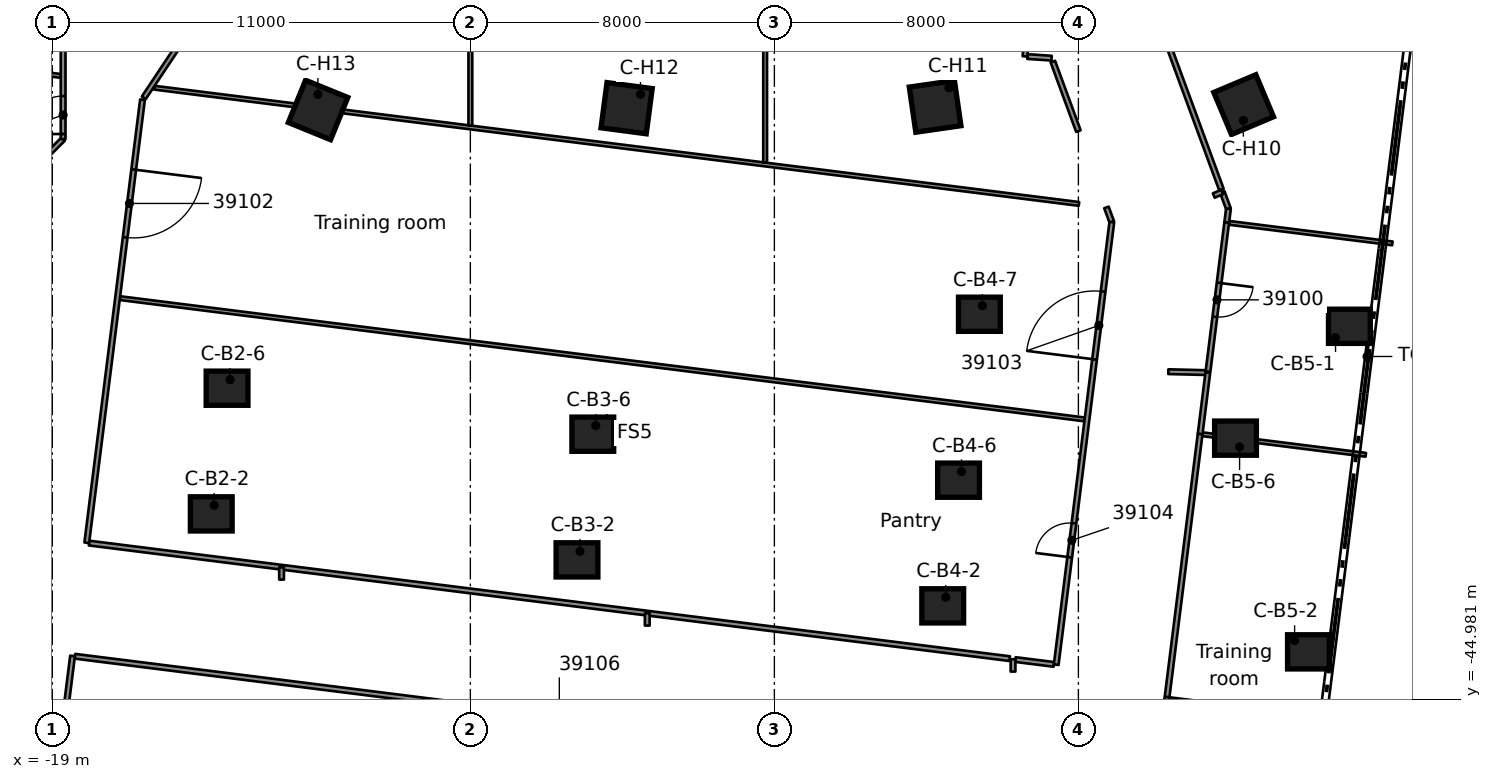
"""IFC4 building model, lengths in metres.
Left out: names, types, materials, properties, quantities, classifications, styles, units other than length and angle.
Written with IfcOpenShell. Run it as: python <this file> out.ifc"""

import sys

from ifc_helpers import new_model, si_unit, direction, frame, frame_2d, origin, origin_2d, place, context, subcontext, project, spatial, rectangle, extrude, element, fill, save


model = new_model("IFC4")
c1 = context("Model", 3, precision=1e-05, world=origin(), true_north=direction((0.0, 1.0)))
c2 = subcontext(c1, "Body", "Model", "MODEL_VIEW")
j1 = project(units=[si_unit("LENGTHUNIT", "METRE"), si_unit("PLANEANGLEUNIT", "RADIAN")], contexts=[c1])
p1 = place(None, origin())
s1 = spatial("IfcSite", under=j1, at=p1, CompositionType="ELEMENT")
p2 = place(p1, origin())
s2 = spatial("IfcBuilding", under=s1, at=p2, CompositionType="ELEMENT")
p3 = place(p2, frame((0.0, 0.0, 192.1)))
s3 = spatial("IfcBuildingStorey", under=s2, at=p3, CompositionType="ELEMENT", Elevation=192.1)
for number, where, z_axis, x_axis in (
    (1, (-14.818, -40.098, 0.0), (0.0, 0.0, 1.0), (1.0, 0.0, 0.0)),
    (2, (-14.402, -36.791, 0.0), (0.0, 0.0, 1.0), (1.0, 0.0, 0.0)),
    (3, (-5.194, -41.308, 0.0), (0.0, 0.0, 1.0), (1.0, 0.0, 0.0)),
    (4, (-4.778, -38.001, 0.0), (0.0, 0.0, 1.0), (1.0, 0.0, 0.0)),
    (5, (4.43, -42.518, 0.0), (0.0, 0.0, 1.0), (1.0, 0.0, 0.0)),
    (6, (4.846, -39.211, 0.0), (0.0, 0.0, 1.0), (1.0, 0.0, 0.0)),
    (7, (5.395, -34.845, 0.0), (0.0, 0.0, 1.0), (1.0, 0.0, 0.0)),
    (8, (15.131, -35.162, 0.0), (0.0, 0.0, 1.0), (1.0, 0.0, 0.0)),
    (9, (14.054, -43.728, 0.0), (0.0, 0.0, 1.0), (1.0, 0.0, 0.0)),
    (10, (12.134, -38.105, 0.0), (0.0, 0.0, 1.0), (1.0, 0.0, 0.0)),
):
    element("IfcColumn", number, at=place(p3, frame(where, z_axis=z_axis, x_axis=x_axis)), inside=s3, PredefinedType="COLUMN", context=c2, shape_type="SweptSolid", body=[
        extrude(rectangle(XDim=1.1, YDim=0.9, at=origin_2d()), origin(), (0.0, 0.0, 1.0), 3.5),
    ])
for number, where, z_axis, x_axis in (
    (11, (12.349, -29.329, 0.0), (0.0, 0.0, 1.0), (0.388, -0.922, 0.0)),
    (12, (4.23, -29.376, 0.0), (0.0, 0.0, 1.0), (0.143, -0.99, 0.0)),
    (13, (-3.888, -29.423, 0.0), (0.0, 0.0, 1.0), (-0.131, -0.991, 0.0)),
    (14, (-12.007, -29.47, 0.0), (0.0, 0.0, 1.0), (-0.377, -0.926, 0.0)),
):
    element("IfcColumn", number, at=place(p3, frame(where, z_axis=z_axis, x_axis=x_axis)), inside=s3, PredefinedType="COLUMN", context=c2, shape_type="SweptSolid", body=[
        extrude(rectangle(XDim=1.2, YDim=1.2, at=origin_2d()), origin(), (0.0, 0.0, 1.0), 3.5),
    ])
p4 = place(p3, frame((7.328, -28.197, 0.0), z_axis=(0.0, 0.0, 1.0), x_axis=(0.34495039198, -0.938620917662, 0.0)))
e15 = element("IfcWall", 15, at=p4, inside=s3, PredefinedType="PARTITIONING", context=c2, shape_type="SweptSolid", body=[
    extrude(rectangle(XDim=1.948, YDim=0.125, at=frame_2d((0.974, 0.0))), origin(), (0.0, 0.0, 1.0), 3.06),
])
p5 = place(p3, frame((8.738, -32.034, 0.0), z_axis=(0.0, 0.0, 1.0), x_axis=(0.344934891115, -0.938626614204, 0.0)))
e16 = element("IfcWall", 16, at=p5, inside=s3, PredefinedType="PARTITIONING", context=c2, shape_type="SweptSolid", body=[
    extrude(rectangle(XDim=0.411, YDim=0.125, at=frame_2d((0.206, 0.0))), origin(), (0.0, 0.0, 1.0), 3.06),
])
p6 = place(p3, frame((11.786, -31.628, 0.0), z_axis=(0.0, 0.0, 1.0), x_axis=(0.346065449672, -0.938210373287, 0.0)))
e17 = element("IfcWall", 17, at=p6, inside=s3, PredefinedType="PARTITIONING", context=c2, shape_type="SweptSolid", body=[
    extrude(rectangle(XDim=0.471, YDim=0.125, at=frame_2d((0.236, 0.0))), origin(), (0.0, 0.0, 1.0), 3.06),
])
p7 = place(p3, frame((10.365, -27.761, 0.0), z_axis=(0.0, 0.0, 1.0), x_axis=(0.34515538391, -0.938545556144, 0.0)))
e18 = element("IfcWall", 18, at=p7, inside=s3, PredefinedType="PARTITIONING", context=c2, shape_type="SweptSolid", body=[
    extrude(rectangle(XDim=4.053, YDim=0.125, at=frame_2d((2.026, 0.0))), origin(), (0.0, 0.0, 1.0), 3.06),
])
p8 = place(p3, frame((6.979, -47.035, 0.0), z_axis=(0.0, 0.0, 1.0), x_axis=(-0.992192052325, 0.124719410292, 0.0)))
e19 = element("IfcWall", 19, at=p8, inside=s3, PredefinedType="PARTITIONING", context=c2, shape_type="SweptSolid", body=[
    extrude(rectangle(XDim=25.585, YDim=0.125, at=frame_2d((12.792, 0.0))), origin(), (0.0, 0.0, 1.0), 3.06),
])
p9 = place(p8, frame((12.288, 0.0, 0.0)))
e20 = element("IfcOpeningElement", 20, at=p9, cuts=e19, PredefinedType="OPENING", context=c2, shape_type="SweptSolid", body=[
    extrude(rectangle(XDim=0.9, YDim=2.1, at=frame_2d((0.45, 1.05))), frame((0.0, 0.073, 0.0), z_axis=(0.0, -1.0, 0.0), x_axis=(1.0, 0.0, 0.0)), (0.0, 0.0, 1.0), 0.145),
])
p10 = place(p3, frame((-18.032, -40.866, 0.0), z_axis=(0.0, 0.0, 1.0), x_axis=(0.9922120451, -0.124560256738, 0.0)))
e21 = element("IfcWall", 21, at=p10, inside=s3, PredefinedType="PARTITIONING", context=c2, shape_type="SweptSolid", body=[
    extrude(rectangle(XDim=24.414, YDim=0.125, at=frame_2d((12.207, 0.0))), origin(), (0.0, 0.0, 1.0), 3.06),
])
p11 = place(p3, frame((6.342, -43.931, 0.0), z_axis=(0.0, 0.0, 1.0), x_axis=(0.992192944833, -0.124712309833, 0.0)))
e22 = element("IfcWall", 22, at=p11, inside=s3, PredefinedType="PARTITIONING", context=c2, shape_type="SweptSolid", body=[
    extrude(rectangle(XDim=1.02, YDim=0.125, at=frame_2d((0.51, 0.0))), origin(), (0.0, 0.0, 1.0), 3.06),
])
p12 = place(p3, frame((-17.221, -34.421, 0.0), z_axis=(0.0, 0.0, 1.0), x_axis=(0.992190871449, -0.124728804262, 0.0)))
e23 = element("IfcWall", 23, at=p12, inside=s3, PredefinedType="PARTITIONING", context=c2, shape_type="SweptSolid", body=[
    extrude(rectangle(XDim=25.585, YDim=0.1, at=frame_2d((12.792, 0.0))), origin(), (0.0, 0.0, 1.0), 3.06),
])
p13 = place(p3, frame((11.266, -38.003, 0.0), z_axis=(0.0, 0.0, 1.0), x_axis=(0.992194392082, -0.124700795187, 0.0)))
e24 = element("IfcWall", 24, at=p13, inside=s3, PredefinedType="PARTITIONING", context=c2, shape_type="SweptSolid", body=[
    extrude(rectangle(XDim=4.331, YDim=0.1, at=frame_2d((2.165, 0.0))), origin(), (0.0, 0.0, 1.0), 3.06),
])
p14 = place(p3, frame((-23.921, -27.927, 0.0), z_axis=(0.0, 0.0, 1.0), x_axis=(0.992179743224, -0.124817295018, 0.0)))
e25 = element("IfcWall", 25, at=p14, inside=s3, PredefinedType="PARTITIONING", context=c2, shape_type="SweptSolid", body=[
    extrude(rectangle(XDim=5.183, YDim=0.1, at=frame_2d((2.592, 0.0))), origin(), (0.0, 0.0, 1.0), 3.06),
])
p15 = place(p3, frame((-16.315, -28.884, 0.0), z_axis=(0.0, 0.0, 1.0), x_axis=(0.992194172305, -0.124702543857, 0.0)))
e26 = element("IfcWall", 26, at=p15, inside=s3, PredefinedType="PARTITIONING", context=c2, shape_type="SweptSolid", body=[
    extrude(rectangle(XDim=24.521, YDim=0.1, at=frame_2d((12.261, 0.0))), origin(), (0.0, 0.0, 1.0), 3.06),
])
p16 = place(p3, frame((11.965, -32.44, 0.0), z_axis=(0.0, 0.0, 1.0), x_axis=(0.992194392082, -0.124700795187, 0.0)))
e27 = element("IfcWall", 27, at=p16, inside=s3, PredefinedType="PARTITIONING", context=c2, shape_type="SweptSolid", body=[
    extrude(rectangle(XDim=4.331, YDim=0.1, at=frame_2d((2.165, 0.0))), origin(), (0.0, 0.0, 1.0), 3.06),
])
p17 = place(p3, frame((6.658, -28.064, 0.0), z_axis=(0.0, 0.0, 1.0), x_axis=(0.997732391846, -0.067305826357, 0.0)))
e28 = element("IfcWall", 28, at=p17, inside=s3, PredefinedType="PARTITIONING", context=c2, shape_type="SweptSolid", body=[
    extrude(rectangle(XDim=0.638, YDim=0.125, at=frame_2d((0.319, 0.0))), origin(), (0.0, 0.0, 1.0), 3.06),
])
p18 = place(p3, frame((10.366, -36.356, 0.0), z_axis=(0.0, 0.0, 1.0), x_axis=(0.999700907591, -0.024455988254, 0.0)))
e29 = element("IfcWall", 29, at=p18, inside=s3, PredefinedType="PARTITIONING", context=c2, shape_type="SweptSolid", body=[
    extrude(rectangle(XDim=0.978, YDim=0.125, at=frame_2d((0.489, 0.0))), origin(), (0.0, 0.0, 1.0), 3.06),
])
p19 = place(p3, frame((-19.182, -30.703, 0.0), z_axis=(0.0, 0.0, 1.0), x_axis=(0.707106781187, 0.707106781187, 0.0)))
e30 = element("IfcWall", 30, at=p19, inside=s3, PredefinedType="PARTITIONING", context=c2, shape_type="SweptSolid", body=[
    extrude(rectangle(XDim=0.659, YDim=0.125, at=frame_2d((0.329, 0.0))), origin(), (0.0, 0.0, 1.0), 3.06),
])
p20 = place(p3, frame((11.563, -31.721, 0.0), z_axis=(0.0, 0.0, 1.0), x_axis=(0.921426271694, 0.3885532471, 0.0)))
e31 = element("IfcWall", 31, at=p20, inside=s3, PredefinedType="PARTITIONING", context=c2, shape_type="SweptSolid", body=[
    extrude(rectangle(XDim=0.242, YDim=0.125, at=frame_2d((0.121, 0.0))), origin(), (0.0, 0.0, 1.0), 3.06),
])
p21 = place(p3, frame((-13.009, -23.769, 0.0), z_axis=(0.0, 0.0, 1.0), x_axis=(-0.554421269435, -0.832236178016, 0.0)))
e32 = element("IfcWall", 32, at=p21, inside=s3, PredefinedType="PARTITIONING", context=c2, shape_type="SweptSolid", body=[
    extrude(rectangle(XDim=6.464, YDim=0.125, at=frame_2d((3.232, 0.0))), origin(), (0.0, 0.0, 1.0), 3.06),
])
p22 = place(p3, frame((11.903, -32.432, 0.0), z_axis=(0.0, 0.0, 1.0), x_axis=(0.125847054802, 0.992049655409, 0.0)))
e33 = element("IfcWall", 33, at=p22, inside=s3, PredefinedType="PARTITIONING", context=c2, shape_type="SweptSolid", body=[
    extrude(rectangle(XDim=0.365, YDim=0.125, at=frame_2d((0.182, 0.0))), origin(), (0.0, 0.0, 1.0), 3.06),
])
p23 = place(p3, frame((11.204, -37.994, 0.0), z_axis=(0.0, 0.0, 1.0), x_axis=(-0.124754953573, -0.992187583856, 0.0)))
e34 = element("IfcWall", 34, at=p23, inside=s3, PredefinedType="PARTITIONING", context=c2, shape_type="SweptSolid", body=[
    extrude(rectangle(XDim=12.849, YDim=0.125, at=frame_2d((6.425, 0.0))), origin(), (0.0, 0.0, 1.0), 3.06),
])
p24 = place(p23, frame((6.976, 0.0, 0.0)))
e35 = element("IfcOpeningElement", 35, at=p24, cuts=e34, PredefinedType="OPENING", context=c2, shape_type="SweptSolid", body=[
    extrude(rectangle(XDim=1.0, YDim=2.1, at=frame_2d((0.5, 1.05))), frame((0.0, 0.073, 0.0), z_axis=(0.0, -1.0, 0.0), x_axis=(1.0, 0.0, 0.0)), (0.0, 0.0, 1.0), 0.145),
])
p25 = place(p3, frame((11.903, -32.432, 0.0), z_axis=(0.0, 0.0, 1.0), x_axis=(-0.124726255985, -0.992191191791, 0.0)))
e36 = element("IfcWall", 36, at=p25, inside=s3, PredefinedType="PARTITIONING", context=c2, shape_type="SweptSolid", body=[
    extrude(rectangle(XDim=3.954, YDim=0.125, at=frame_2d((1.977, 0.0))), origin(), (0.0, 0.0, 1.0), 3.06),
])
p26 = place(p25, frame((1.6, 0.0, 0.0)))
e37 = element("IfcOpeningElement", 37, at=p26, cuts=e36, PredefinedType="OPENING", context=c2, shape_type="SweptSolid", body=[
    extrude(rectangle(XDim=0.9, YDim=2.1, at=frame_2d((0.45, 1.05))), frame((0.0, 0.073, 0.0), z_axis=(0.0, -1.0, 0.0), x_axis=(1.0, 0.0, 0.0)), (0.0, 0.0, 1.0), 0.145),
])
p27 = place(p3, frame((7.416, -44.066, 0.0), z_axis=(0.0, 0.0, 1.0), x_axis=(0.124705364761, 0.992193817759, 0.0)))
e38 = element("IfcWall", 38, at=p27, inside=s3, PredefinedType="PARTITIONING", context=c2, shape_type="SweptSolid", body=[
    extrude(rectangle(XDim=11.739, YDim=0.125, at=frame_2d((5.869, 0.0))), origin(), (0.0, 0.0, 1.0), 3.06),
])
p28 = place(p27, frame((8.097, 0.0, 0.0)))
e39 = element("IfcOpeningElement", 39, at=p28, cuts=e38, PredefinedType="OPENING", context=c2, shape_type="SweptSolid", body=[
    extrude(rectangle(XDim=1.8, YDim=2.1, at=frame_2d((0.9, 1.05))), frame((0.0, 0.073, 0.0), z_axis=(0.0, -1.0, 0.0), x_axis=(1.0, 0.0, 0.0)), (0.0, 0.0, 1.0), 0.145),
])
p29 = place(p27, frame((2.85, 0.0, 0.0)))
e40 = element("IfcOpeningElement", 40, at=p29, cuts=e38, PredefinedType="OPENING", context=c2, shape_type="SweptSolid", body=[
    extrude(rectangle(XDim=0.9, YDim=2.1, at=frame_2d((0.45, 1.05))), frame((0.0, 0.073, 0.0), z_axis=(0.0, -1.0, 0.0), x_axis=(1.0, 0.0, 0.0)), (0.0, 0.0, 1.0), 0.145),
])
p30 = place(p3, frame((-18.468, -43.836, 0.0), z_axis=(0.0, 0.0, 1.0), x_axis=(-0.124739851626, -0.992189482617, 0.0)))
e41 = element("IfcWall", 41, at=p30, inside=s3, PredefinedType="PARTITIONING", context=c2, shape_type="SweptSolid", body=[
    extrude(rectangle(XDim=3.366, YDim=0.125, at=frame_2d((1.683, 0.0))), origin(), (0.0, 0.0, 1.0), 3.06),
])
p31 = place(p30, frame((1.35, 0.0, 0.0)))
e42 = element("IfcOpeningElement", 42, at=p31, cuts=e41, PredefinedType="OPENING", context=c2, shape_type="SweptSolid", body=[
    extrude(rectangle(XDim=0.9, YDim=2.1, at=frame_2d((0.45, 1.05))), frame((0.0, 0.073, 0.0), z_axis=(0.0, -1.0, 0.0), x_axis=(1.0, 0.0, 0.0)), (0.0, 0.0, 1.0), 0.145),
])
p32 = place(p3, frame((-16.627, -29.199, 0.0), z_axis=(0.0, 0.0, 1.0), x_axis=(-0.124845291818, -0.992176220795, 0.0)))
e43 = element("IfcWall", 43, at=p32, inside=s3, PredefinedType="PARTITIONING", context=c2, shape_type="SweptSolid", body=[
    extrude(rectangle(XDim=11.751, YDim=0.125, at=frame_2d((5.875, 0.0))), origin(), (0.0, 0.0, 1.0), 3.06),
])
p33 = place(p32, frame((1.852, 0.0, 0.0)))
e44 = element("IfcOpeningElement", 44, at=p33, cuts=e43, PredefinedType="OPENING", context=c2, shape_type="SweptSolid", body=[
    extrude(rectangle(XDim=1.8, YDim=2.1, at=frame_2d((0.9, 1.05))), frame((0.0, 0.073, 0.0), z_axis=(0.0, -1.0, 0.0), x_axis=(1.0, 0.0, 0.0)), (0.0, 0.0, 1.0), 0.145),
])
p34 = place(p3, frame((11.204, -37.995, 0.0), z_axis=(0.0, 0.0, 1.0), x_axis=(0.124201089062, 0.992257068242, 0.0)))
e45 = element("IfcWall", 45, at=p34, inside=s3, PredefinedType="PARTITIONING", context=c2, shape_type="SweptSolid", body=[
    extrude(rectangle(XDim=1.626, YDim=0.125, at=frame_2d((0.813, 0.0))), origin(), (0.0, 0.0, 1.0), 3.06),
])
p35 = place(p3, frame((6.596, -28.059, 0.0), z_axis=(0.0, 0.0, 1.0), x_axis=(0.066948921555, 0.99775640409, 0.0)))
e46 = element("IfcWall", 46, at=p35, inside=s3, PredefinedType="PARTITIONING", context=c2, shape_type="SweptSolid", body=[
    extrude(rectangle(XDim=10.44, YDim=0.125, at=frame_2d((5.22, 0.0))), origin(), (0.0, 0.0, 1.0), 3.06),
])
p36 = place(p35, frame((4.85, 0.0, 0.0)))
e47 = element("IfcOpeningElement", 47, at=p36, cuts=e46, PredefinedType="OPENING", context=c2, shape_type="SweptSolid", body=[
    extrude(rectangle(XDim=0.9, YDim=2.1, at=frame_2d((0.45, 1.05))), frame((0.0, 0.073, 0.0), z_axis=(0.0, -1.0, 0.0), x_axis=(1.0, 0.0, 0.0)), (0.0, 0.0, 1.0), 0.145),
])
p37 = place(p3, frame((6.28, -44.247, 0.0), z_axis=(0.0, 0.0, 1.0), x_axis=(0.0, 1.0, 0.0)))
e48 = element("IfcWall", 48, at=p37, inside=s3, PredefinedType="PARTITIONING", context=c2, shape_type="SweptSolid", body=[
    extrude(rectangle(XDim=0.324, YDim=0.125, at=frame_2d((0.162, 0.0))), origin(), (0.0, 0.0, 1.0), 3.06),
])
p38 = place(p3, frame((-0.243, -30.854, 0.0), z_axis=(0.0, 0.0, 1.0), x_axis=(0.0, 1.0, 0.0)))
e49 = element("IfcWall", 49, at=p38, inside=s3, PredefinedType="PARTITIONING", context=c2, shape_type="SweptSolid", body=[
    extrude(rectangle(XDim=16.391, YDim=0.1, at=frame_2d((8.196, 0.0))), origin(), (0.0, 0.0, 1.0), 3.06),
])
p39 = place(p3, frame((-3.345, -43.037, 0.0), z_axis=(0.0, 0.0, 1.0), x_axis=(0.0, 1.0, 0.0)))
e50 = element("IfcWall", 50, at=p39, inside=s3, PredefinedType="PARTITIONING", context=c2, shape_type="SweptSolid", body=[
    extrude(rectangle(XDim=0.324, YDim=0.125, at=frame_2d((0.162, 0.0))), origin(), (0.0, 0.0, 1.0), 3.06),
])
p40 = place(p3, frame((-8.0, -29.879, 0.0), z_axis=(0.0, 0.0, 1.0), x_axis=(0.0, 1.0, 0.0)))
e51 = element("IfcWall", 51, at=p40, inside=s3, PredefinedType="PARTITIONING", context=c2, shape_type="SweptSolid", body=[
    extrude(rectangle(XDim=15.416, YDim=0.1, at=frame_2d((7.708, 0.0))), origin(), (0.0, 0.0, 1.0), 3.06),
])
p41 = place(p3, frame((-12.968, -41.827, 0.0), z_axis=(0.0, 0.0, 1.0), x_axis=(0.0, 1.0, 0.0)))
e52 = element("IfcWall", 52, at=p41, inside=s3, PredefinedType="PARTITIONING", context=c2, shape_type="SweptSolid", body=[
    extrude(rectangle(XDim=0.324, YDim=0.125, at=frame_2d((0.162, 0.0))), origin(), (0.0, 0.0, 1.0), 3.06),
])
p42 = place(p3, frame((-18.716, -30.237, 0.0), z_axis=(0.0, 0.0, 1.0), x_axis=(0.0, 1.0, 0.0)))
e53 = element("IfcWall", 53, at=p42, inside=s3, PredefinedType="PARTITIONING", context=c2, shape_type="SweptSolid", body=[
    extrude(rectangle(XDim=2.826, YDim=0.125, at=frame_2d((1.413, 0.0))), origin(), (0.0, 0.0, 1.0), 3.06),
])
p43 = place(p42, frame((0.134, 0.0, 0.0)))
e54 = element("IfcOpeningElement", 54, at=p43, cuts=e53, PredefinedType="OPENING", context=c2, shape_type="SweptSolid", body=[
    extrude(rectangle(XDim=1.0, YDim=2.1, at=frame_2d((0.5, 1.05))), frame((0.0, 0.073, 0.0), z_axis=(0.0, -1.0, 0.0), x_axis=(1.0, 0.0, 0.0)), (0.0, 0.0, 1.0), 0.145),
])
p44 = place(p26, origin())
e55 = element("IfcDoor", 55, at=p44, inside=s3, OperationType="SINGLE_SWING_RIGHT", PredefinedType="DOOR", context=c2, shape_type="SweptSolid", body=[
    extrude(rectangle(XDim=0.9, YDim=2.1, at=frame_2d((0.45, 1.05))), frame((0.0, 0.025, 0.0), z_axis=(0.0, -1.0, 0.0), x_axis=(1.0, 0.0, 0.0)), (0.0, 0.0, 1.0), 0.05),
])
fill(e37, e55)
p45 = place(p24, origin())
e56 = element("IfcDoor", 56, at=p45, inside=s3, OperationType="SINGLE_SWING_RIGHT", PredefinedType="DOOR", context=c2, shape_type="SweptSolid", body=[
    extrude(rectangle(XDim=1.0, YDim=2.1, at=frame_2d((0.5, 1.05))), frame((0.0, 0.025, 0.0), z_axis=(0.0, -1.0, 0.0), x_axis=(1.0, 0.0, 0.0)), (0.0, 0.0, 1.0), 0.05),
])
fill(e35, e56)
p46 = place(p33, origin())
e57 = element("IfcDoor", 57, at=p46, inside=s3, OperationType="DOUBLE_DOOR_SINGLE_SWING", PredefinedType="DOOR", context=c2, shape_type="SweptSolid", body=[
    extrude(rectangle(XDim=1.8, YDim=2.1, at=frame_2d((0.9, 1.05))), frame((0.0, 0.025, 0.0), z_axis=(0.0, -1.0, 0.0), x_axis=(1.0, 0.0, 0.0)), (0.0, 0.0, 1.0), 0.05),
])
fill(e44, e57)
p47 = place(p28, origin())
e58 = element("IfcDoor", 58, at=p47, inside=s3, OperationType="DOUBLE_DOOR_SINGLE_SWING", PredefinedType="DOOR", context=c2, shape_type="SweptSolid", body=[
    extrude(rectangle(XDim=1.8, YDim=2.1, at=frame_2d((0.9, 1.05))), frame((0.0, 0.025, 0.0), z_axis=(0.0, -1.0, 0.0), x_axis=(1.0, 0.0, 0.0)), (0.0, 0.0, 1.0), 0.05),
])
fill(e39, e58)
p48 = place(p29, origin())
e59 = element("IfcDoor", 59, at=p48, inside=s3, OperationType="SINGLE_SWING_LEFT", PredefinedType="DOOR", context=c2, shape_type="SweptSolid", body=[
    extrude(rectangle(XDim=0.9, YDim=2.1, at=frame_2d((0.45, 1.05))), frame((0.0, 0.025, 0.0), z_axis=(0.0, -1.0, 0.0), x_axis=(1.0, 0.0, 0.0)), (0.0, 0.0, 1.0), 0.05),
])
fill(e40, e59)
p49 = place(p43, origin())
e60 = element("IfcDoor", 60, at=p49, inside=s3, OperationType="SINGLE_SWING_LEFT", PredefinedType="DOOR", context=c2, shape_type="SweptSolid", body=[
    extrude(rectangle(XDim=1.0, YDim=2.1, at=frame_2d((0.5, 1.05))), frame((0.0, 0.025, 0.0), z_axis=(0.0, -1.0, 0.0), x_axis=(1.0, 0.0, 0.0)), (0.0, 0.0, 1.0), 0.05),
])
fill(e54, e60)
save(model, sys.argv[1])
